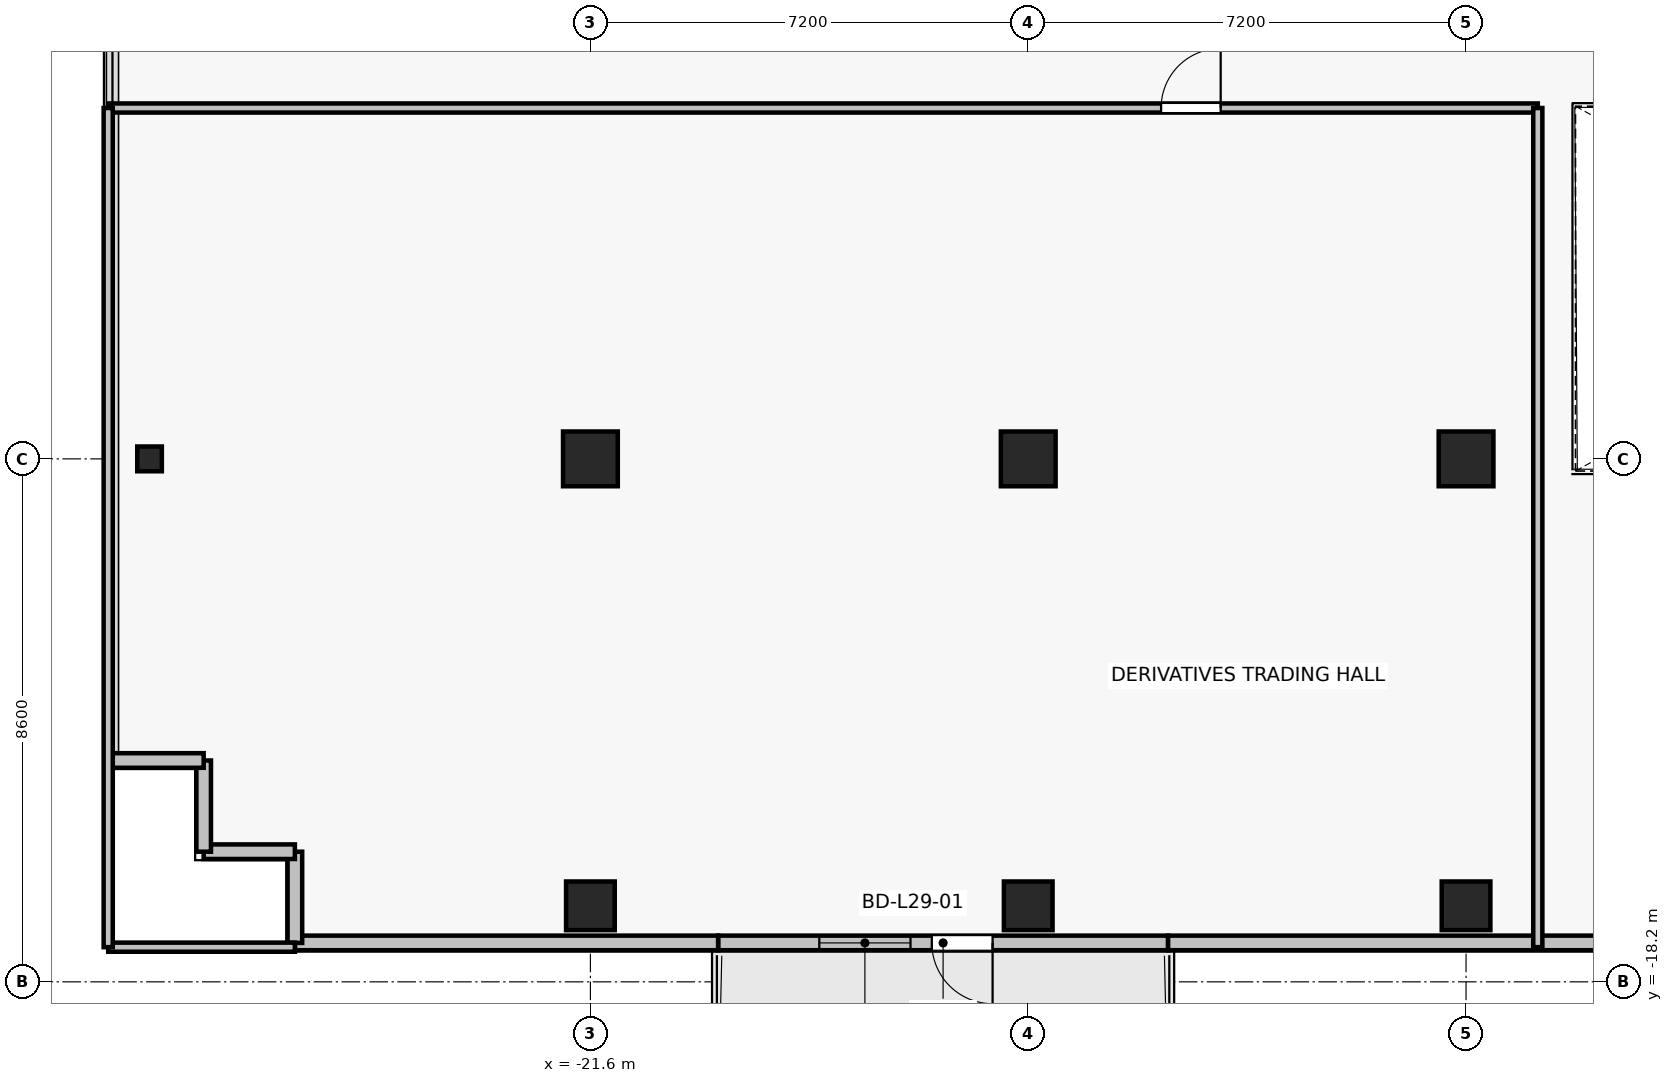
"""IFC4 building model, lengths in metres.
Left out: names, types, materials, properties, quantities, classifications, styles, units other than length and angle.
Written with IfcOpenShell. Run it as: python <this file> out.ifc"""

import sys

from ifc_helpers import new_model, si_unit, direction, frame, frame_2d, origin, origin_2d, place, context, subcontext, project, spatial, rectangle, i_section, extrude, source, transform, mapped, element, fill, save


model = new_model("IFC4")
c1 = context("Model", 3, precision=1e-05, world=origin(), true_north=direction((0.0, 1.0)))
c2 = subcontext(c1, "Body", "Model", "MODEL_VIEW")
j1 = project(units=[si_unit("LENGTHUNIT", "METRE"), si_unit("PLANEANGLEUNIT", "RADIAN")], contexts=[c1])
p1 = place(None, origin())
s1 = spatial("IfcSite", under=j1, at=p1, CompositionType="ELEMENT")
p2 = place(p1, origin())
s2 = spatial("IfcBuilding", under=s1, at=p2, CompositionType="ELEMENT")
p3 = place(p2, frame((0.0, 0.0, 106.6)))
s3 = spatial("IfcBuildingStorey", under=s2, at=p3, CompositionType="ELEMENT", Elevation=106.6)
for number, where, z_axis, x_axis in (
    (1, (-14.4, -9.6, 0.0), (0.0, 0.0, 1.0), (1.0, 0.0, 0.0)),
    (2, (-7.2, -9.6, 0.0), (0.0, 0.0, 1.0), (1.0, 0.0, 0.0)),
    (3, (-21.6, -9.6, 0.0), (0.0, 0.0, 1.0), (1.0, 0.0, 0.0)),
):
    element("IfcColumn", number, at=place(p3, frame(where, z_axis=z_axis, x_axis=x_axis)), inside=s3, PredefinedType="COLUMN", context=c2, shape_type="SweptSolid", body=[
        extrude(rectangle(XDim=0.9, YDim=0.9, at=origin_2d()), origin(), (0.0, 0.0, 1.0), 3.3),
    ])
for number, where, z_axis, x_axis in (
    (4, (-14.4, -16.95, 0.0), (0.0, 0.0, 1.0), (1.0, 0.0, 0.0)),
    (5, (-7.2, -16.95, 0.0), (0.0, 0.0, 1.0), (1.0, 0.0, 0.0)),
    (6, (-21.6, -16.95, 0.0), (0.0, 0.0, 1.0), (1.0, 0.0, 0.0)),
):
    element("IfcColumn", number, at=place(p3, frame(where, z_axis=z_axis, x_axis=x_axis)), inside=s3, PredefinedType="COLUMN", context=c2, shape_type="SweptSolid", body=[
        extrude(rectangle(XDim=0.8, YDim=0.8, at=origin_2d()), origin(), (0.0, 0.0, 1.0), 3.3),
    ])
p4 = place(p3, frame((-28.85, -9.6, 0.0), z_axis=(0.0, 0.0, 1.0), x_axis=(1.0, 0.0, 0.0)))
e7 = element("IfcColumn", 7, at=p4, inside=s3, PredefinedType="COLUMN", context=c2, shape_type="SweptSolid", body=[
    extrude(i_section(OverallWidth=0.404, OverallDepth=0.407, WebThickness=0.022, FlangeThickness=0.032, FilletRadius=0.015, at=origin_2d()), origin(), (0.0, 0.0, 1.0), 3.3),
])
p5 = place(p3, frame((-12.1, -17.56, 0.0), z_axis=(0.0, 0.0, 1.0), x_axis=(-1.0, 0.0, 0.0)))
e8 = element("IfcWall", 8, at=p5, inside=s3, PredefinedType="SOLIDWALL", context=c2, shape_type="SweptSolid", body=[
    extrude(rectangle(XDim=7.4, YDim=0.24, at=frame_2d((3.7, 0.0))), origin(), (0.0, 0.0, 1.0), 2.665),
])
p6 = place(p5, frame((2.886, 0.0, 0.0)))
e9 = element("IfcOpeningElement", 9, at=p6, cuts=e8, PredefinedType="OPENING", context=c2, shape_type="SweptSolid", body=[
    extrude(rectangle(XDim=1.0, YDim=2.2, at=frame_2d((0.5, 1.1))), frame((0.0, 0.13, 0.0), z_axis=(0.0, -1.0, 0.0), x_axis=(1.0, 0.0, 0.0)), (0.0, 0.0, 1.0), 0.26),
])
p7 = place(p5, frame((4.236, 0.0, 0.85)))
e10 = element("IfcOpeningElement", 10, at=p7, cuts=e8, PredefinedType="OPENING", context=c2, shape_type="SweptSolid", body=[
    extrude(rectangle(XDim=1.5, YDim=1.6, at=frame_2d((0.75, 0.8))), frame((0.0, 0.13, 0.0), z_axis=(0.0, -1.0, 0.0), x_axis=(1.0, 0.0, 0.0)), (0.0, 0.0, 1.0), 0.26),
])
p8 = place(p3, frame((-12.1, -17.56, 0.0), z_axis=(0.0, 0.0, 1.0), x_axis=(1.0, 0.0, 0.0)))
e11 = element("IfcWall", 11, at=p8, inside=s3, PredefinedType="SOLIDWALL", context=c2, shape_type="SweptSolid", body=[
    extrude(rectangle(XDim=8.76, YDim=0.24, at=frame_2d((4.38, 0.0))), origin(), (0.0, 0.0, 1.0), 3.075),
])
p9 = place(p3, frame((-26.46, -17.56, 0.0), z_axis=(0.0, 0.0, 1.0), x_axis=(1.0, 0.0, 0.0)))
e12 = element("IfcWall", 12, at=p9, inside=s3, PredefinedType="SOLIDWALL", context=c2, shape_type="SweptSolid", body=[
    extrude(rectangle(XDim=6.96, YDim=0.24, at=frame_2d((3.48, 0.0))), origin(), (0.0, 0.0, 1.0), 2.665),
])
for number, where, z_axis, x_axis in (
    (13, (-26.46, -16.06, 0.0), (0.0, 0.0, 1.0), (0.0, -1.0, 0.0)),
    (14, (-27.96, -16.06, 0.0), (0.0, 0.0, 1.0), (1.0, 0.0, 0.0)),
    (15, (-27.96, -14.56, 0.0), (0.0, 0.0, 1.0), (0.0, -1.0, 0.0)),
    (16, (-29.46, -14.56, 0.0), (0.0, 0.0, 1.0), (1.0, 0.0, 0.0)),
):
    element("IfcWall", number, at=place(p3, frame(where, z_axis=z_axis, x_axis=x_axis)), inside=s3, PredefinedType="SOLIDWALL", context=c2, shape_type="SweptSolid", body=[
        extrude(rectangle(XDim=1.5, YDim=0.24, at=frame_2d((0.75, 0.0))), origin(), (0.0, 0.0, 1.0), 3.075),
    ])
p10 = place(p3, frame((-26.46, -17.63, 0.0), z_axis=(0.0, 0.0, 1.0), x_axis=(-1.0, 0.0, 0.0)))
e17 = element("IfcWall", 17, at=p10, inside=s3, PredefinedType="PARTITIONING", context=c2, shape_type="SweptSolid", body=[
    extrude(rectangle(XDim=3.07, YDim=0.15, at=frame_2d((1.535, 0.0))), origin(), (0.0, 0.0, 1.0), 2.665),
])
p11 = place(p3, frame((-29.53, -3.83, 0.0), z_axis=(0.0, 0.0, 1.0), x_axis=(1.0, 0.0, 0.0)))
e18 = element("IfcWall", 18, at=p11, inside=s3, PredefinedType="PARTITIONING", context=c2, shape_type="SweptSolid", body=[
    extrude(rectangle(XDim=23.51, YDim=0.15, at=frame_2d((11.755, 0.0))), origin(), (0.0, 0.0, 1.0), 2.515),
])
p12 = place(p11, frame((17.315, 0.0, 0.0)))
e19 = element("IfcOpeningElement", 19, at=p12, cuts=e18, PredefinedType="OPENING", context=c2, shape_type="SweptSolid", body=[
    extrude(rectangle(XDim=0.98, YDim=2.15, at=frame_2d((0.49, 1.075))), frame((0.0, 0.085, 0.0), z_axis=(0.0, -1.0, 0.0), x_axis=(1.0, 0.0, 0.0)), (0.0, 0.0, 1.0), 0.17),
])
p13 = place(p3, frame((-29.53, -17.63, 0.0), z_axis=(0.0, 0.0, 1.0), x_axis=(0.0, 1.0, 0.0)))
e20 = element("IfcWall", 20, at=p13, inside=s3, PredefinedType="PARTITIONING", context=c2, shape_type="SweptSolid", body=[
    extrude(rectangle(XDim=13.8, YDim=0.15, at=frame_2d((6.9, 0.0))), origin(), (0.0, 0.0, 1.0), 2.665),
])
p14 = place(p3, frame((-6.02, -3.83, 0.0), z_axis=(0.0, 0.0, 1.0), x_axis=(0.0, -1.0, 0.0)))
e21 = element("IfcWall", 21, at=p14, inside=s3, PredefinedType="PARTITIONING", context=c2, shape_type="SweptSolid", body=[
    extrude(rectangle(XDim=13.8, YDim=0.15, at=frame_2d((6.9, 0.0))), origin(), (0.0, 0.0, 1.0), 2.515),
])
m1 = source(origin(), c2, "Body", "SweptSolid", [
    extrude(rectangle(XDim=1.0, YDim=2.2, at=frame_2d((0.5, 1.1))), frame((0.0, 0.025, 0.0), z_axis=(0.0, -1.0, 0.0), x_axis=(1.0, 0.0, 0.0)), (0.0, 0.0, 1.0), 0.05),
])
p15 = place(p6, origin())
e22 = element("IfcDoor", 22, at=p15, inside=s3, OperationType="SINGLE_SWING_LEFT", PredefinedType="DOOR", context=c2, shape_type="MappedRepresentation", body=[
    mapped(m1, transform((0.0, 0.0, 0.0), x_axis=(1.0, 0.0, 0.0), y_axis=(0.0, 1.0, 0.0), z_axis=(0.0, 0.0, 1.0), scale=1.0)),
])
fill(e9, e22)
m2 = source(origin(), c2, "Body", "SweptSolid", [
    extrude(rectangle(XDim=1.5, YDim=1.6, at=frame_2d((0.75, 0.8))), frame((0.0, 0.03, 0.0), z_axis=(0.0, -1.0, 0.0), x_axis=(1.0, 0.0, 0.0)), (0.0, 0.0, 1.0), 0.06),
])
p16 = place(p7, origin())
e23 = element("IfcWindow", 23, at=p16, inside=s3, PartitioningType="SINGLE_PANEL", PredefinedType="WINDOW", context=c2, shape_type="MappedRepresentation", body=[
    mapped(m2, transform((0.0, 0.0, 0.0), x_axis=(1.0, 0.0, 0.0), y_axis=(0.0, 1.0, 0.0), z_axis=(0.0, 0.0, 1.0), scale=1.0)),
])
fill(e10, e23)
m3 = source(origin(), c2, "Body", "SweptSolid", [
    extrude(rectangle(XDim=0.98, YDim=2.15, at=frame_2d((0.49, 1.075))), frame((0.0, 0.025, 0.0), z_axis=(0.0, -1.0, 0.0), x_axis=(1.0, 0.0, 0.0)), (0.0, 0.0, 1.0), 0.05),
])
p17 = place(p12, origin())
e24 = element("IfcDoor", 24, at=p17, inside=s3, OperationType="SINGLE_SWING_RIGHT", PredefinedType="DOOR", context=c2, shape_type="MappedRepresentation", body=[
    mapped(m3, transform((0.0, 0.0, 0.0), x_axis=(1.0, 0.0, 0.0), y_axis=(0.0, 1.0, 0.0), z_axis=(0.0, 0.0, 1.0), scale=1.0)),
])
fill(e19, e24)
save(model, sys.argv[1])
